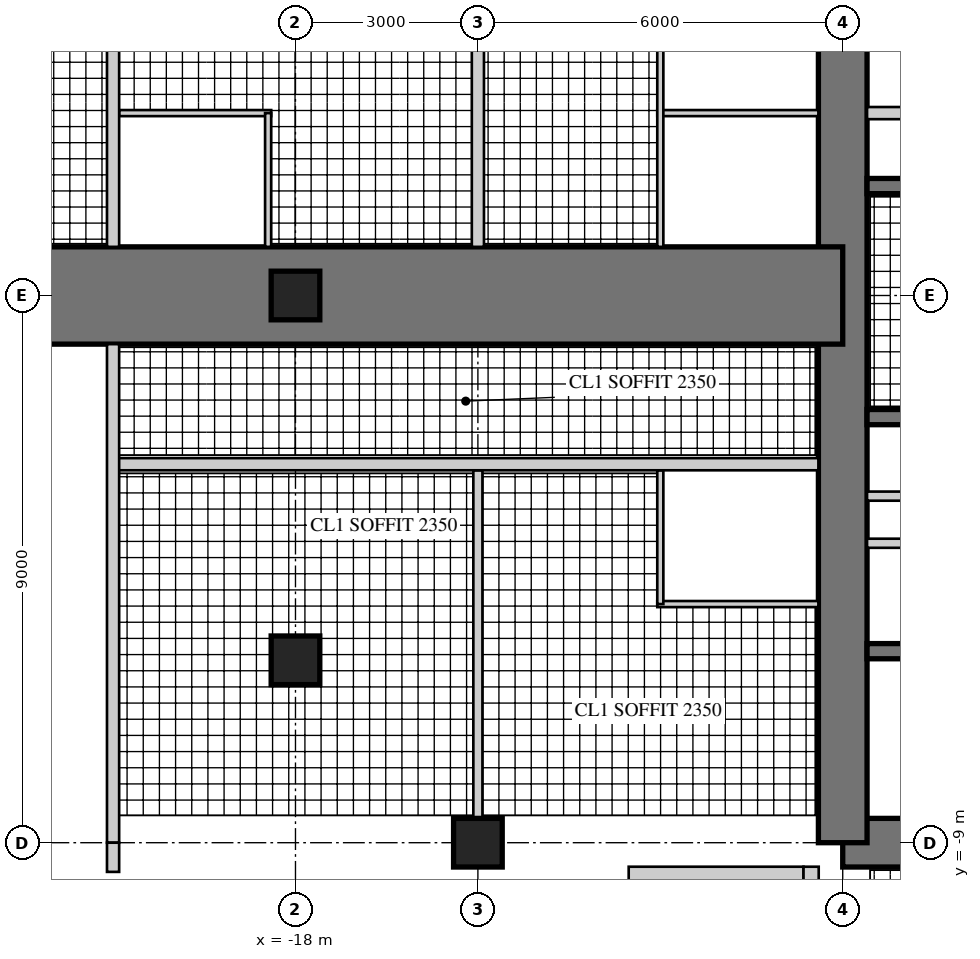
"""IFC4 building model, lengths in metres.
Left out: names, types, materials, properties, quantities, classifications, styles, units other than length and angle.
Written with IfcOpenShell. Run it as: python <this file> out.ifc"""

import sys

from ifc_helpers import new_model, si_unit, direction, frame, frame_2d, origin, origin_2d, place, context, subcontext, project, spatial, rectangle, hollow_rectangle, extrude, element, fill, save


model = new_model("IFC4")
c1 = context("Model", 3, precision=1e-05, world=origin(), true_north=direction((0.0, 1.0)))
c2 = subcontext(c1, "Body", "Model", "MODEL_VIEW")
j1 = project(units=[si_unit("LENGTHUNIT", "METRE"), si_unit("PLANEANGLEUNIT", "RADIAN")], contexts=[c1])
p1 = place(None, origin())
s1 = spatial("IfcSite", under=j1, at=p1, CompositionType="ELEMENT")
p2 = place(p1, origin())
s2 = spatial("IfcBuilding", under=s1, at=p2, CompositionType="ELEMENT")
p3 = place(p2, frame((0.0, 0.0, 235.7)))
s3 = spatial("IfcBuildingStorey", under=s2, at=p3, CompositionType="ELEMENT", Elevation=235.7)
p4 = place(p3, frame((-9.0, -9.0, 0.0), z_axis=(0.0, 0.0, 1.0), x_axis=(1.0, 0.0, 0.0)))
e1 = element("IfcWall", 1, at=p4, inside=s3, PredefinedType="SHEAR", context=c2, shape_type="SweptSolid", body=[
    extrude(rectangle(XDim=18.0, YDim=0.8, at=frame_2d((9.0, 0.0))), origin(), (0.0, 0.0, 1.0), 3.4),
])
p5 = place(p4, frame((9.8, 0.0, 0.0)))
e2 = element("IfcOpeningElement", 2, at=p5, cuts=e1, PredefinedType="OPENING", context=c2, shape_type="SweptSolid", body=[
    extrude(rectangle(XDim=1.0, YDim=2.4, at=frame_2d((0.5, 1.2))), frame((0.0, 0.41, 0.0), z_axis=(0.0, -1.0, 0.0), x_axis=(1.0, 0.0, 0.0)), (0.0, 0.0, 1.0), 0.82),
])
p6 = place(p3, frame((-9.0, 9.0, 0.0), z_axis=(0.0, 0.0, 1.0), x_axis=(0.0, -1.0, 0.0)))
e3 = element("IfcWall", 3, at=p6, inside=s3, PredefinedType="SHEAR", context=c2, shape_type="SweptSolid", body=[
    extrude(rectangle(XDim=18.0, YDim=0.8, at=frame_2d((9.0, 0.0))), origin(), (0.0, 0.0, 1.0), 3.4),
])
p7 = place(p6, frame((9.8, 0.0, 0.0)))
e4 = element("IfcOpeningElement", 4, at=p7, cuts=e3, PredefinedType="OPENING", context=c2, shape_type="SweptSolid", body=[
    extrude(rectangle(XDim=1.0, YDim=2.4, at=frame_2d((0.5, 1.2))), frame((0.0, 0.41, 0.0), z_axis=(0.0, -1.0, 0.0), x_axis=(1.0, 0.0, 0.0)), (0.0, 0.0, 1.0), 0.82),
])
p8 = place(p3, frame((-2.125, 1.8, 0.0), z_axis=(0.0, 0.0, 1.0), x_axis=(-1.0, 0.0, 0.0)))
e5 = element("IfcWall", 5, at=p8, inside=s3, PredefinedType="SHEAR", context=c2, shape_type="SweptSolid", body=[
    extrude(rectangle(XDim=6.475, YDim=0.25, at=frame_2d((3.238, 0.0))), origin(), (0.0, 0.0, 1.0), 3.4),
])
p9 = place(p3, frame((-5.725, 3.0, 0.0), z_axis=(0.0, 0.0, 1.0), x_axis=(-1.0, 0.0, 0.0)))
e6 = element("IfcWall", 6, at=p9, inside=s3, PredefinedType="PARTITIONING", context=c2, shape_type="SweptSolid", body=[
    extrude(rectangle(XDim=2.875, YDim=0.2, at=frame_2d((1.438, 0.0))), origin(), (0.0, 0.0, 1.0), 3.4),
])
p10 = place(p3, frame((-1.925, -2.0, 0.0), z_axis=(0.0, 0.0, 1.0), x_axis=(-1.0, 0.0, 0.0)))
e7 = element("IfcWall", 7, at=p10, inside=s3, PredefinedType="SHEAR", context=c2, shape_type="SweptSolid", body=[
    extrude(rectangle(XDim=6.675, YDim=0.25, at=frame_2d((3.337, 0.0))), origin(), (0.0, 0.0, 1.0), 3.4),
])
p11 = place(p3, frame((-1.925, -5.85, 0.0), z_axis=(0.0, 0.0, 1.0), x_axis=(-1.0, 0.0, 0.0)))
e8 = element("IfcWall", 8, at=p11, inside=s3, PredefinedType="SHEAR", context=c2, shape_type="SweptSolid", body=[
    extrude(rectangle(XDim=6.675, YDim=0.25, at=frame_2d((3.337, 0.0))), origin(), (0.0, 0.0, 1.0), 3.4),
])
p12 = place(p11, frame((0.496, 0.0, 0.0)))
e9 = element("IfcOpeningElement", 9, at=p12, cuts=e8, PredefinedType="OPENING", context=c2, shape_type="SweptSolid", body=[
    extrude(rectangle(XDim=1.1, YDim=2.2, at=frame_2d((0.55, 1.1))), frame((0.0, 0.135, 0.0), z_axis=(0.0, -1.0, 0.0), x_axis=(1.0, 0.0, 0.0)), (0.0, 0.0, 1.0), 0.27),
])
p13 = place(p11, frame((2.788, 0.0, 0.0)))
e10 = element("IfcOpeningElement", 10, at=p13, cuts=e8, PredefinedType="OPENING", context=c2, shape_type="SweptSolid", body=[
    extrude(rectangle(XDim=1.1, YDim=2.2, at=frame_2d((0.55, 1.1))), frame((0.0, 0.135, 0.0), z_axis=(0.0, -1.0, 0.0), x_axis=(1.0, 0.0, 0.0)), (0.0, 0.0, 1.0), 0.27),
])
p14 = place(p11, frame((5.079, 0.0, 0.0)))
e11 = element("IfcOpeningElement", 11, at=p14, cuts=e8, PredefinedType="OPENING", context=c2, shape_type="SweptSolid", body=[
    extrude(rectangle(XDim=1.1, YDim=2.2, at=frame_2d((0.55, 1.1))), frame((0.0, 0.135, 0.0), z_axis=(0.0, -1.0, 0.0), x_axis=(1.0, 0.0, 0.0)), (0.0, 0.0, 1.0), 0.27),
])
p15 = place(p3, frame((-1.925, -3.3, 0.0), z_axis=(0.0, 0.0, 1.0), x_axis=(-1.0, 0.0, 0.0)))
e12 = element("IfcWall", 12, at=p15, inside=s3, PredefinedType="PARTITIONING", context=c2, shape_type="SweptSolid", body=[
    extrude(rectangle(XDim=6.675, YDim=0.15, at=frame_2d((3.337, 0.0))), origin(), (0.0, 0.0, 1.0), 3.4),
])
p16 = place(p15, frame((0.075, 0.0, 0.0)))
e13 = element("IfcOpeningElement", 13, at=p16, cuts=e12, PredefinedType="OPENING", context=c2, shape_type="SweptSolid", body=[
    extrude(rectangle(XDim=0.8, YDim=2.1, at=frame_2d((0.4, 1.05))), frame((0.0, 0.085, 0.0), z_axis=(0.0, -1.0, 0.0), x_axis=(1.0, 0.0, 0.0)), (0.0, 0.0, 1.0), 0.17),
])
p17 = place(p15, frame((3.675, 0.0, 0.0)))
e14 = element("IfcOpeningElement", 14, at=p17, cuts=e12, PredefinedType="OPENING", context=c2, shape_type="SweptSolid", body=[
    extrude(rectangle(XDim=0.8, YDim=2.1, at=frame_2d((0.4, 1.05))), frame((0.0, 0.085, 0.0), z_axis=(0.0, -1.0, 0.0), x_axis=(1.0, 0.0, 0.0)), (0.0, 0.0, 1.0), 0.17),
])
p18 = place(p3, frame((-9.0, 0.0, 0.0), z_axis=(0.0, 0.0, 1.0), x_axis=(-1.0, 0.0, 0.0)))
e15 = element("IfcWall", 15, at=p18, inside=s3, PredefinedType="SHEAR", context=c2, shape_type="SweptSolid", body=[
    extrude(rectangle(XDim=18.0, YDim=1.6, at=frame_2d((9.0, 0.0))), origin(), (0.0, 0.0, 1.0), 3.4),
])
p19 = place(p18, frame((3.8, 0.0, 0.0)))
e16 = element("IfcOpeningElement", 16, at=p19, cuts=e15, PredefinedType="OPENING", context=c2, shape_type="SweptSolid", body=[
    extrude(rectangle(XDim=1.0, YDim=2.15, at=frame_2d((0.5, 1.075))), frame((0.0, 0.81, 0.0), z_axis=(0.0, -1.0, 0.0), x_axis=(1.0, 0.0, 0.0)), (0.0, 0.0, 1.0), 1.62),
])
p20 = place(p18, frame((6.6, 0.0, 0.0)))
e17 = element("IfcOpeningElement", 17, at=p20, cuts=e15, PredefinedType="OPENING", context=c2, shape_type="SweptSolid", body=[
    extrude(rectangle(XDim=1.0, YDim=2.15, at=frame_2d((0.5, 1.075))), frame((0.0, 0.81, 0.0), z_axis=(0.0, -1.0, 0.0), x_axis=(1.0, 0.0, 0.0)), (0.0, 0.0, 1.0), 1.62),
])
p21 = place(p18, frame((13.3, 0.0, 0.0)))
e18 = element("IfcOpeningElement", 18, at=p21, cuts=e15, PredefinedType="OPENING", context=c2, shape_type="SweptSolid", body=[
    extrude(rectangle(XDim=1.0, YDim=2.2, at=frame_2d((0.5, 1.1))), frame((0.0, 0.81, 0.0), z_axis=(0.0, -1.0, 0.0), x_axis=(1.0, 0.0, 0.0)), (0.0, 0.0, 1.0), 1.62),
])
for number, where, z_axis, x_axis in (
    (19, (-15.0, -9.0, 0.0), (0.0, 0.0, 1.0), (1.0, 0.0, 0.0)),
    (20, (-18.0, 0.0, 0.0), (0.0, 0.0, 1.0), (1.0, 0.0, 0.0)),
    (21, (-18.0, -6.0, 0.0), (0.0, 0.0, 1.0), (1.0, 0.0, 0.0)),
):
    element("IfcColumn", number, at=place(p3, frame(where, z_axis=z_axis, x_axis=x_axis)), inside=s3, PredefinedType="COLUMN", context=c2, shape_type="SweptSolid", body=[
        extrude(rectangle(XDim=0.8, YDim=0.8, at=origin_2d()), origin(), (0.0, 0.0, 1.0), 3.4),
    ])
p22 = place(p3, frame((-12.52, -9.52, 0.0), z_axis=(0.0, 0.0, 1.0), x_axis=(1.0, 0.0, 0.0)))
e22 = element("IfcWall", 22, at=p22, inside=s3, PredefinedType="SOLIDWALL", context=c2, shape_type="SweptSolid", body=[
    extrude(rectangle(XDim=2.875, YDim=0.25, at=frame_2d((1.438, 0.0))), origin(), (0.0, 0.0, 1.0), 3.22),
])
p23 = place(p22, frame((0.6, 0.0, 0.0)))
e23 = element("IfcOpeningElement", 23, at=p23, cuts=e22, PredefinedType="OPENING", context=c2, shape_type="SweptSolid", body=[
    extrude(rectangle(XDim=1.0, YDim=2.2, at=frame_2d((0.5, 1.1))), frame((0.0, 0.135, 0.0), z_axis=(0.0, -1.0, 0.0), x_axis=(1.0, 0.0, 0.0)), (0.0, 0.0, 1.0), 0.27),
])
p24 = place(p3, frame((-9.52, -9.395, 0.0), z_axis=(0.0, 0.0, 1.0), x_axis=(0.0, -1.0, 0.0)))
e24 = element("IfcWall", 24, at=p24, inside=s3, PredefinedType="SOLIDWALL", context=c2, shape_type="SweptSolid", body=[
    extrude(rectangle(XDim=3.125, YDim=0.25, at=frame_2d((1.562, 0.0))), origin(), (0.0, 0.0, 1.0), 3.22),
])
p25 = place(p24, frame((0.6, 0.0, 0.0)))
e25 = element("IfcOpeningElement", 25, at=p25, cuts=e24, PredefinedType="OPENING", context=c2, shape_type="SweptSolid", body=[
    extrude(rectangle(XDim=1.0, YDim=2.2, at=frame_2d((0.5, 1.1))), frame((0.0, 0.135, 0.0), z_axis=(0.0, -1.0, 0.0), x_axis=(1.0, 0.0, 0.0)), (0.0, 0.0, 1.0), 0.27),
])
p26 = place(p3, frame((-3.325, -4.075, 0.0), z_axis=(0.0, 0.0, 1.0), x_axis=(-1.0, 0.0, 0.0)))
e26 = element("IfcWall", 26, at=p26, inside=s3, PredefinedType="PARTITIONING", context=c2, shape_type="SweptSolid", body=[
    extrude(rectangle(XDim=5.275, YDim=0.15, at=frame_2d((2.638, 0.0))), origin(), (0.0, 0.0, 1.0), 3.22),
])
p27 = place(p26, frame((2.137, 0.0, 0.0)))
e27 = element("IfcOpeningElement", 27, at=p27, cuts=e26, PredefinedType="OPENING", context=c2, shape_type="SweptSolid", body=[
    extrude(rectangle(XDim=1.0, YDim=2.1, at=frame_2d((0.5, 1.05))), frame((0.0, 0.085, 0.0), z_axis=(0.0, -1.0, 0.0), x_axis=(1.0, 0.0, 0.0)), (0.0, 0.0, 1.0), 0.17),
])
p28 = place(p3, frame((-9.4, -5.075, 0.0), z_axis=(0.0, 0.0, 1.0), x_axis=(-1.0, 0.0, 0.0)))
e28 = element("IfcWall", 28, at=p28, inside=s3, PredefinedType="PARTITIONING", context=c2, shape_type="SweptSolid", body=[
    extrude(rectangle(XDim=2.65, YDim=0.1, at=frame_2d((1.325, 0.0))), origin(), (0.0, 0.0, 1.0), 3.22),
])
p29 = place(p3, frame((-12.0, -2.875, 0.0), z_axis=(0.0, 0.0, 1.0), x_axis=(0.0, -1.0, 0.0)))
e29 = element("IfcWall", 29, at=p29, inside=s3, PredefinedType="PARTITIONING", context=c2, shape_type="SweptSolid", body=[
    extrude(rectangle(XDim=2.2, YDim=0.1, at=frame_2d((1.1, 0.0))), origin(), (0.0, 0.0, 1.0), 3.22),
])
p30 = place(p29, frame((0.55, 0.0, 0.0)))
e30 = element("IfcOpeningElement", 30, at=p30, cuts=e29, PredefinedType="OPENING", context=c2, shape_type="SweptSolid", body=[
    extrude(rectangle(XDim=0.9, YDim=2.1, at=frame_2d((0.45, 1.05))), frame((0.0, 0.06, 0.0), z_axis=(0.0, -1.0, 0.0), x_axis=(1.0, 0.0, 0.0)), (0.0, 0.0, 1.0), 0.12),
])
p31 = place(p3, frame((-15.0, -2.875, 0.0), z_axis=(0.0, 0.0, 1.0), x_axis=(0.0, -1.0, 0.0)))
e31 = element("IfcWall", 31, at=p31, inside=s3, PredefinedType="PARTITIONING", context=c2, shape_type="SweptSolid", body=[
    extrude(rectangle(XDim=5.725, YDim=0.15, at=frame_2d((2.863, 0.0))), origin(), (0.0, 0.0, 1.0), 2.52),
])
p32 = place(p31, frame((0.5, 0.0, 0.0)))
e32 = element("IfcOpeningElement", 32, at=p32, cuts=e31, PredefinedType="OPENING", context=c2, shape_type="SweptSolid", body=[
    extrude(rectangle(XDim=1.0, YDim=2.1, at=frame_2d((0.5, 1.05))), frame((0.0, 0.085, 0.0), z_axis=(0.0, -1.0, 0.0), x_axis=(1.0, 0.0, 0.0)), (0.0, 0.0, 1.0), 0.17),
])
p33 = place(p3, frame((-9.4, 3.0, 0.0), z_axis=(0.0, 0.0, 1.0), x_axis=(-1.0, 0.0, 0.0)))
e33 = element("IfcWall", 33, at=p33, inside=s3, PredefinedType="PARTITIONING", context=c2, shape_type="SweptSolid", body=[
    extrude(rectangle(XDim=2.65, YDim=0.1, at=frame_2d((1.325, 0.0))), origin(), (0.0, 0.0, 1.0), 3.22),
])
p34 = place(p3, frame((-12.0, 9.395, 0.0), z_axis=(0.0, 0.0, 1.0), x_axis=(0.0, -1.0, 0.0)))
e34 = element("IfcWall", 34, at=p34, inside=s3, PredefinedType="PARTITIONING", context=c2, shape_type="SweptSolid", body=[
    extrude(rectangle(XDim=8.595, YDim=0.1, at=frame_2d((4.297, 0.0))), origin(), (0.0, 0.0, 1.0), 3.22),
])
p35 = place(p34, frame((5.045, 0.0, 0.0)))
e35 = element("IfcOpeningElement", 35, at=p35, cuts=e34, PredefinedType="OPENING", context=c2, shape_type="SweptSolid", body=[
    extrude(rectangle(XDim=0.9, YDim=2.1, at=frame_2d((0.45, 1.05))), frame((0.0, 0.06, 0.0), z_axis=(0.0, -1.0, 0.0), x_axis=(1.0, 0.0, 0.0)), (0.0, 0.0, 1.0), 0.12),
])
p36 = place(p34, frame((7.145, 0.0, 0.0)))
e36 = element("IfcOpeningElement", 36, at=p36, cuts=e34, PredefinedType="OPENING", context=c2, shape_type="SweptSolid", body=[
    extrude(rectangle(XDim=0.9, YDim=2.1, at=frame_2d((0.45, 1.05))), frame((0.0, 0.06, 0.0), z_axis=(0.0, -1.0, 0.0), x_axis=(1.0, 0.0, 0.0)), (0.0, 0.0, 1.0), 0.12),
])
p37 = place(p3, frame((-15.0, 8.6, 0.0), z_axis=(0.0, 0.0, 1.0), x_axis=(0.0, -1.0, 0.0)))
e37 = element("IfcWall", 37, at=p37, inside=s3, PredefinedType="SOLIDWALL", context=c2, shape_type="SweptSolid", body=[
    extrude(rectangle(XDim=7.8, YDim=0.2, at=frame_2d((3.9, 0.0))), origin(), (0.0, 0.0, 1.0), 2.52),
])
p38 = place(p3, frame((-18.4, 3.0, 0.0), z_axis=(0.0, 0.0, 1.0), x_axis=(-1.0, 0.0, 0.0)))
e38 = element("IfcWall", 38, at=p38, inside=s3, PredefinedType="PARTITIONING", context=c2, shape_type="SweptSolid", body=[
    extrude(rectangle(XDim=2.5, YDim=0.1, at=frame_2d((1.25, 0.0))), origin(), (0.0, 0.0, 1.0), 3.22),
])
p39 = place(p3, frame((-18.45, 3.0, 0.0), z_axis=(0.0, 0.0, 1.0), x_axis=(0.0, -1.0, 0.0)))
e39 = element("IfcWall", 39, at=p39, inside=s3, PredefinedType="PARTITIONING", context=c2, shape_type="SweptSolid", body=[
    extrude(rectangle(XDim=2.2, YDim=0.1, at=frame_2d((1.1, 0.0))), origin(), (0.0, 0.0, 1.0), 3.22),
])
p40 = place(p39, frame((0.55, 0.0, 0.0)))
e40 = element("IfcOpeningElement", 40, at=p40, cuts=e39, PredefinedType="OPENING", context=c2, shape_type="SweptSolid", body=[
    extrude(rectangle(XDim=0.9, YDim=2.1, at=frame_2d((0.45, 1.05))), frame((0.0, 0.06, 0.0), z_axis=(0.0, -1.0, 0.0), x_axis=(1.0, 0.0, 0.0)), (0.0, 0.0, 1.0), 0.12),
])
p41 = place(p3, frame((-9.4, -2.775, 0.0), z_axis=(0.0, 0.0, 1.0), x_axis=(-1.0, 0.0, 0.0)))
e41 = element("IfcWall", 41, at=p41, inside=s3, PredefinedType="SOLIDWALL", context=c2, shape_type="SweptSolid", body=[
    extrude(rectangle(XDim=11.6, YDim=0.2, at=frame_2d((5.8, 0.0))), origin(), (0.0, 0.0, 1.0), 3.22),
])
p42 = place(p41, frame((3.4, 0.0, 0.0)))
e42 = element("IfcOpeningElement", 42, at=p42, cuts=e41, PredefinedType="OPENING", context=c2, shape_type="SweptSolid", body=[
    extrude(rectangle(XDim=1.0, YDim=2.15, at=frame_2d((0.5, 1.075))), frame((0.0, 0.11, 0.0), z_axis=(0.0, -1.0, 0.0), x_axis=(1.0, 0.0, 0.0)), (0.0, 0.0, 1.0), 0.22),
])
p43 = place(p3, frame((-21.0, 9.0, 0.0), z_axis=(0.0, 0.0, 1.0), x_axis=(0.0, -1.0, 0.0)))
e43 = element("IfcWall", 43, at=p43, inside=s3, PredefinedType="SOLIDWALL", context=c2, shape_type="SweptSolid", body=[
    extrude(rectangle(XDim=8.2, YDim=0.2, at=frame_2d((4.1, 0.0))), origin(), (0.0, 0.0, 1.0), 2.67),
])
p44 = place(p3, frame((-21.0, -0.8, 0.0), z_axis=(0.0, 0.0, 1.0), x_axis=(0.0, -1.0, 0.0)))
e44 = element("IfcWall", 44, at=p44, inside=s3, PredefinedType="SOLIDWALL", context=c2, shape_type="SweptSolid", body=[
    extrude(rectangle(XDim=8.2, YDim=0.2, at=frame_2d((4.1, 0.0))), origin(), (0.0, 0.0, 1.0), 2.67),
])
p45 = place(p44, frame((0.35, 0.0, 0.0)))
e45 = element("IfcOpeningElement", 45, at=p45, cuts=e44, PredefinedType="OPENING", context=c2, shape_type="SweptSolid", body=[
    extrude(rectangle(XDim=1.0, YDim=2.2, at=frame_2d((0.5, 1.1))), frame((0.0, 0.11, 0.0), z_axis=(0.0, -1.0, 0.0), x_axis=(1.0, 0.0, 0.0)), (0.0, 0.0, 1.0), 0.22),
])
p46 = place(p3, frame((-21.0, -9.0, 0.0), z_axis=(0.0, 0.0, 1.0), x_axis=(0.0, -1.0, 0.0)))
e46 = element("IfcWall", 46, at=p46, inside=s3, PredefinedType="SOLIDWALL", context=c2, shape_type="SweptSolid", body=[
    extrude(rectangle(XDim=0.48, YDim=0.2, at=frame_2d((0.24, 0.0))), origin(), (0.0, 0.0, 1.0), 3.22),
])
p47 = place(p23, origin())
e47 = element("IfcDoor", 47, at=p47, inside=s3, OperationType="SINGLE_SWING_RIGHT", PredefinedType="DOOR", context=c2, shape_type="SweptSolid", body=[
    extrude(hollow_rectangle(XDim=1.0, YDim=2.2, WallThickness=0.06, at=frame_2d((0.5, 1.1))), frame((0.0, 0.025, 0.0), z_axis=(0.0, -1.0, 0.0), x_axis=(1.0, 0.0, 0.0)), (0.0, 0.0, 1.0), 0.05),
    extrude(rectangle(XDim=0.879, YDim=2.079, at=frame_2d((0.5, 1.1))), frame((0.0, 0.025, 0.0), z_axis=(0.0, -1.0, 0.0), x_axis=(1.0, 0.0, 0.0)), (0.0, 0.0, 1.0), 0.05),
])
fill(e23, e47)
p48 = place(p30, origin())
e48 = element("IfcDoor", 48, at=p48, inside=s3, OperationType="SINGLE_SWING_LEFT", PredefinedType="DOOR", context=c2, shape_type="SweptSolid", body=[
    extrude(rectangle(XDim=0.9, YDim=2.1, at=frame_2d((0.45, 1.05))), frame((0.0, 0.025, 0.0), z_axis=(0.0, -1.0, 0.0), x_axis=(1.0, 0.0, 0.0)), (0.0, 0.0, 1.0), 0.05),
])
fill(e30, e48)
p49 = place(p32, origin())
e49 = element("IfcDoor", 49, at=p49, inside=s3, OperationType="SINGLE_SWING_LEFT", PredefinedType="DOOR", context=c2, shape_type="SweptSolid", body=[
    extrude(rectangle(XDim=1.0, YDim=2.1, at=frame_2d((0.5, 1.05))), frame((0.0, 0.025, 0.0), z_axis=(0.0, -1.0, 0.0), x_axis=(1.0, 0.0, 0.0)), (0.0, 0.0, 1.0), 0.05),
])
fill(e32, e49)
p50 = place(p35, origin())
e50 = element("IfcDoor", 50, at=p50, inside=s3, OperationType="SINGLE_SWING_RIGHT", PredefinedType="DOOR", context=c2, shape_type="SweptSolid", body=[
    extrude(rectangle(XDim=0.9, YDim=2.1, at=frame_2d((0.45, 1.05))), frame((0.0, 0.025, 0.0), z_axis=(0.0, -1.0, 0.0), x_axis=(1.0, 0.0, 0.0)), (0.0, 0.0, 1.0), 0.05),
])
fill(e35, e50)
p51 = place(p36, origin())
e51 = element("IfcDoor", 51, at=p51, inside=s3, OperationType="SINGLE_SWING_RIGHT", PredefinedType="DOOR", context=c2, shape_type="SweptSolid", body=[
    extrude(rectangle(XDim=0.9, YDim=2.1, at=frame_2d((0.45, 1.05))), frame((0.0, 0.025, 0.0), z_axis=(0.0, -1.0, 0.0), x_axis=(1.0, 0.0, 0.0)), (0.0, 0.0, 1.0), 0.05),
])
fill(e36, e51)
p52 = place(p40, frame((0.9, 0.0, 0.0), z_axis=(0.0, 0.0, 1.0), x_axis=(-1.0, 0.0, 0.0)))
e52 = element("IfcDoor", 52, at=p52, inside=s3, OperationType="SINGLE_SWING_RIGHT", PredefinedType="DOOR", context=c2, shape_type="SweptSolid", body=[
    extrude(rectangle(XDim=0.9, YDim=2.1, at=frame_2d((0.45, 1.05))), frame((0.0, 0.025, 0.0), z_axis=(0.0, -1.0, 0.0), x_axis=(1.0, 0.0, 0.0)), (0.0, 0.0, 1.0), 0.05),
])
fill(e40, e52)
p53 = place(p42, origin())
e53 = element("IfcDoor", 53, at=p53, inside=s3, OperationType="SINGLE_SWING_LEFT", PredefinedType="DOOR", context=c2, shape_type="SweptSolid", body=[
    extrude(rectangle(XDim=1.0, YDim=2.15, at=frame_2d((0.5, 1.075))), frame((0.0, 0.025, 0.0), z_axis=(0.0, -1.0, 0.0), x_axis=(1.0, 0.0, 0.0)), (0.0, 0.0, 1.0), 0.05),
])
fill(e42, e53)
p54 = place(p45, frame((1.0, 0.0, 0.0), z_axis=(0.0, 0.0, 1.0), x_axis=(-1.0, 0.0, 0.0)))
e54 = element("IfcDoor", 54, at=p54, inside=s3, OperationType="SINGLE_SWING_RIGHT", PredefinedType="DOOR", context=c2, shape_type="SweptSolid", body=[
    extrude(rectangle(XDim=1.0, YDim=2.2, at=frame_2d((0.5, 1.1))), frame((0.0, 0.025, 0.0), z_axis=(0.0, -1.0, 0.0), x_axis=(1.0, 0.0, 0.0)), (0.0, 0.0, 1.0), 0.05),
])
fill(e45, e54)
p55 = place(p19, frame((1.0, 0.0, 0.0), z_axis=(0.0, 0.0, 1.0), x_axis=(-1.0, 0.0, 0.0)))
e55 = element("IfcDoor", 55, at=p55, inside=s3, OperationType="SINGLE_SWING_RIGHT", PredefinedType="DOOR", context=c2, shape_type="SweptSolid", body=[
    extrude(rectangle(XDim=1.0, YDim=2.15, at=frame_2d((0.5, 1.075))), frame((0.0, 0.025, 0.0), z_axis=(0.0, -1.0, 0.0), x_axis=(1.0, 0.0, 0.0)), (0.0, 0.0, 1.0), 0.05),
])
fill(e16, e55)
p56 = place(p20, frame((1.0, 0.0, 0.0), z_axis=(0.0, 0.0, 1.0), x_axis=(-1.0, 0.0, 0.0)))
e56 = element("IfcDoor", 56, at=p56, inside=s3, OperationType="SINGLE_SWING_RIGHT", PredefinedType="DOOR", context=c2, shape_type="SweptSolid", body=[
    extrude(rectangle(XDim=1.0, YDim=2.15, at=frame_2d((0.5, 1.075))), frame((0.0, 0.025, 0.0), z_axis=(0.0, -1.0, 0.0), x_axis=(1.0, 0.0, 0.0)), (0.0, 0.0, 1.0), 0.05),
])
fill(e17, e56)
p57 = place(p7, origin())
e57 = element("IfcDoor", 57, at=p57, inside=s3, OperationType="SINGLE_SWING_RIGHT", PredefinedType="DOOR", context=c2, shape_type="SweptSolid", body=[
    extrude(rectangle(XDim=1.0, YDim=2.4, at=frame_2d((0.5, 1.2))), frame((0.0, 0.055, 0.0), z_axis=(0.0, -1.0, 0.0), x_axis=(1.0, 0.0, 0.0)), (0.0, 0.0, 1.0), 0.05),
])
fill(e4, e57)
p58 = place(p14, origin())
e58 = element("IfcDoor", 58, at=p58, inside=s3, OperationType="DOUBLE_DOOR_SLIDING", PredefinedType="DOOR", context=c2, shape_type="SweptSolid", body=[
    extrude(rectangle(XDim=1.1, YDim=2.2, at=frame_2d((0.55, 1.1))), frame((0.0, 0.025, 0.0), z_axis=(0.0, -1.0, 0.0), x_axis=(1.0, 0.0, 0.0)), (0.0, 0.0, 1.0), 0.05),
])
fill(e11, e58)
save(model, sys.argv[1])
